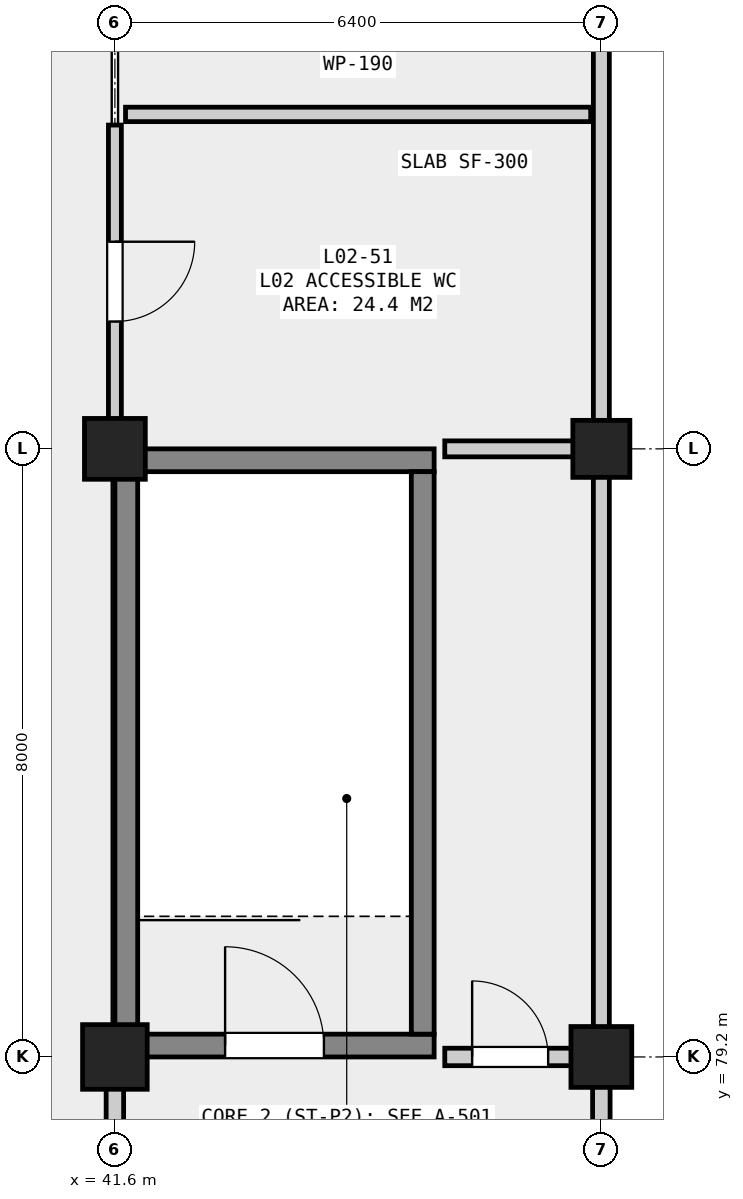
"""IFC4 building model, lengths in metres.
Left out: names, types, materials, properties, quantities, classifications, styles, units other than length and angle.
Written with IfcOpenShell. Run it as: python <this file> out.ifc"""

import sys

from ifc_helpers import new_model, si_unit, direction, frame, frame_2d, origin, origin_2d, place, context, subcontext, project, spatial, rectangle, extrude, element, fill, save


model = new_model("IFC4")
c1 = context("Model", 3, precision=1e-05, world=origin(), true_north=direction((0.0, 1.0)))
c2 = subcontext(c1, "Body", "Model", "MODEL_VIEW")
j1 = project(units=[si_unit("LENGTHUNIT", "METRE"), si_unit("PLANEANGLEUNIT", "RADIAN")], contexts=[c1])
p1 = place(None, origin())
s1 = spatial("IfcSite", under=j1, at=p1, CompositionType="ELEMENT")
p2 = place(p1, origin())
s2 = spatial("IfcBuilding", under=s1, at=p2, CompositionType="ELEMENT")
p3 = place(p2, frame((0.0, 0.0, 10.8)))
s3 = spatial("IfcBuildingStorey", under=s2, at=p3, CompositionType="ELEMENT", Elevation=10.8)
p4 = place(p3, frame((41.6, 79.2, 0.0), z_axis=(0.0, 0.0, 1.0), x_axis=(1.0, 0.0, 0.0)))
e1 = element("IfcColumn", 1, at=p4, inside=s3, PredefinedType="COLUMN", context=c2, shape_type="SweptSolid", body=[
    extrude(rectangle(XDim=0.85, YDim=0.85, at=origin_2d()), origin(), (0.0, 0.0, 1.0), 4.8),
])
for number, where, z_axis, x_axis in (
    (2, (41.6, 87.2, 0.0), (0.0, 0.0, 1.0), (1.0, 0.0, 0.0)),
    (3, (48.0, 79.2, 0.0), (0.0, 0.0, 1.0), (1.0, 0.0, 0.0)),
):
    element("IfcColumn", number, at=place(p3, frame(where, z_axis=z_axis, x_axis=x_axis)), inside=s3, PredefinedType="COLUMN", context=c2, shape_type="SweptSolid", body=[
        extrude(rectangle(XDim=0.8, YDim=0.8, at=origin_2d()), origin(), (0.0, 0.0, 1.0), 4.8),
    ])
p5 = place(p3, frame((48.0, 87.2, 0.0), z_axis=(0.0, 0.0, 1.0), x_axis=(1.0, 0.0, 0.0)))
e4 = element("IfcColumn", 4, at=p5, inside=s3, PredefinedType="COLUMN", context=c2, shape_type="SweptSolid", body=[
    extrude(rectangle(XDim=0.75, YDim=0.75, at=origin_2d()), origin(), (0.0, 0.0, 1.0), 4.8),
])
p6 = place(p3, frame((41.6, 79.35, 0.0), z_axis=(0.0, 0.0, 1.0), x_axis=(1.0, 0.0, 0.0)))
e5 = element("IfcWall", 5, at=p6, inside=s3, PredefinedType="SHEAR", context=c2, shape_type="SweptSolid", body=[
    extrude(rectangle(XDim=4.2, YDim=0.3, at=frame_2d((2.1, 0.0))), origin(), (0.0, 0.0, 1.0), 4.5),
])
p7 = place(p6, frame((1.45, 0.0, 0.0)))
e6 = element("IfcOpeningElement", 6, at=p7, cuts=e5, PredefinedType="OPENING", context=c2, shape_type="SweptSolid", body=[
    extrude(rectangle(XDim=1.3, YDim=2.18, at=frame_2d((0.65, 1.09))), frame((0.0, 0.162, 0.0), z_axis=(0.0, -1.0, 0.0), x_axis=(1.0, 0.0, 0.0)), (0.0, 0.0, 1.0), 0.324),
])
p8 = place(p3, frame((41.6, 87.05, 0.0), z_axis=(0.0, 0.0, 1.0), x_axis=(1.0, 0.0, 0.0)))
e7 = element("IfcWall", 7, at=p8, inside=s3, PredefinedType="SHEAR", context=c2, shape_type="SweptSolid", body=[
    extrude(rectangle(XDim=4.2, YDim=0.3, at=frame_2d((2.1, 0.0))), origin(), (0.0, 0.0, 1.0), 4.5),
])
for number, where, z_axis, x_axis in (
    (8, (41.75, 79.5, 0.0), (0.0, 0.0, 1.0), (0.0, 1.0, 0.0)),
    (9, (45.65, 79.5, 0.0), (0.0, 0.0, 1.0), (0.0, 1.0, 0.0)),
):
    element("IfcWall", number, at=place(p3, frame(where, z_axis=z_axis, x_axis=x_axis)), inside=s3, PredefinedType="SHEAR", context=c2, shape_type="SweptSolid", body=[
        extrude(rectangle(XDim=7.4, YDim=0.3, at=frame_2d((3.7, 0.0))), origin(), (0.0, 0.0, 1.0), 4.5),
    ])
p9 = place(p3, frame((45.94, 79.2, 0.0), z_axis=(0.0, 0.0, 1.0), x_axis=(1.0, 0.0, 0.0)))
e10 = element("IfcWall", 10, at=p9, inside=s3, PredefinedType="SOLIDWALL", context=c2, shape_type="SweptSolid", body=[
    extrude(rectangle(XDim=1.92, YDim=0.23, at=frame_2d((0.96, 0.0))), origin(), (0.0, 0.0, 1.0), 4.5),
])
p10 = place(p9, frame((0.36, 0.0, 0.0)))
e11 = element("IfcOpeningElement", 11, at=p10, cuts=e10, PredefinedType="OPENING", context=c2, shape_type="SweptSolid", body=[
    extrude(rectangle(XDim=1.0, YDim=2.15, at=frame_2d((0.5, 1.075))), frame((0.0, 0.127, 0.0), z_axis=(0.0, -1.0, 0.0), x_axis=(1.0, 0.0, 0.0)), (0.0, 0.0, 1.0), 0.254),
])
p11 = place(p3, frame((41.6, 75.54, 0.0), z_axis=(0.0, 0.0, 1.0), x_axis=(0.0, 1.0, 0.0)))
e12 = element("IfcWall", 12, at=p11, inside=s3, PredefinedType="SOLIDWALL", context=c2, shape_type="SweptSolid", body=[
    extrude(rectangle(XDim=3.52, YDim=0.23, at=frame_2d((1.76, 0.0))), origin(), (0.0, 0.0, 1.0), 4.5),
])
p12 = place(p3, frame((48.0, 75.54, 0.0), z_axis=(0.0, 0.0, 1.0), x_axis=(0.0, 1.0, 0.0)))
e13 = element("IfcWall", 13, at=p12, inside=s3, PredefinedType="SOLIDWALL", context=c2, shape_type="SweptSolid", body=[
    extrude(rectangle(XDim=3.52, YDim=0.23, at=frame_2d((1.76, 0.0))), origin(), (0.0, 0.0, 1.0), 3.9),
])
p13 = place(p3, frame((45.94, 87.2, 0.0), z_axis=(0.0, 0.0, 1.0), x_axis=(1.0, 0.0, 0.0)))
e14 = element("IfcWall", 14, at=p13, inside=s3, PredefinedType="SOLIDWALL", context=c2, shape_type="SweptSolid", body=[
    extrude(rectangle(XDim=1.92, YDim=0.21, at=frame_2d((0.96, 0.0))), origin(), (0.0, 0.0, 1.0), 4.5),
])
p14 = place(p3, frame((48.0, 79.34, 0.0), z_axis=(0.0, 0.0, 1.0), x_axis=(0.0, 1.0, 0.0)))
e15 = element("IfcWall", 15, at=p14, inside=s3, PredefinedType="SOLIDWALL", context=c2, shape_type="SweptSolid", body=[
    extrude(rectangle(XDim=7.72, YDim=0.21, at=frame_2d((3.86, 0.0))), origin(), (0.0, 0.0, 1.0), 3.9),
])
p15 = place(p3, frame((48.0, 87.2, 0.0), z_axis=(0.0, 0.0, 1.0), x_axis=(0.0, 1.0, 0.0)))
e16 = element("IfcWall", 16, at=p15, inside=s3, PredefinedType="SOLIDWALL", context=c2, shape_type="SweptSolid", body=[
    extrude(rectangle(XDim=7.825, YDim=0.21, at=frame_2d((3.913, 0.0))), origin(), (0.0, 0.0, 1.0), 3.9),
])
p16 = place(p3, frame((41.74, 91.6, 0.0), z_axis=(0.0, 0.0, 1.0), x_axis=(1.0, 0.0, 0.0)))
e17 = element("IfcWall", 17, at=p16, inside=s3, PredefinedType="PARTITIONING", context=c2, shape_type="SweptSolid", body=[
    extrude(rectangle(XDim=6.12, YDim=0.19, at=frame_2d((3.06, 0.0))), origin(), (0.0, 0.0, 1.0), 4.5),
])
p17 = place(p3, frame((41.6, 87.34, 0.0), z_axis=(0.0, 0.0, 1.0), x_axis=(0.0, 1.0, 0.0)))
e18 = element("IfcWall", 18, at=p17, inside=s3, PredefinedType="PARTITIONING", context=c2, shape_type="SweptSolid", body=[
    extrude(rectangle(XDim=4.12, YDim=0.17, at=frame_2d((2.06, 0.0))), origin(), (0.0, 0.0, 1.0), 4.5),
])
p18 = place(p17, frame((1.535, 0.0, 0.0)))
e19 = element("IfcOpeningElement", 19, at=p18, cuts=e18, PredefinedType="OPENING", context=c2, shape_type="SweptSolid", body=[
    extrude(rectangle(XDim=1.05, YDim=2.15, at=frame_2d((0.525, 1.075))), frame((0.0, 0.097, 0.0), z_axis=(0.0, -1.0, 0.0), x_axis=(1.0, 0.0, 0.0)), (0.0, 0.0, 1.0), 0.194),
])
p19 = place(p7, origin())
e20 = element("IfcDoor", 20, at=p19, inside=s3, OperationType="SINGLE_SWING_LEFT", PredefinedType="DOOR", context=c2, shape_type="SweptSolid", body=[
    extrude(rectangle(XDim=1.3, YDim=2.18, at=frame_2d((0.65, 1.09))), frame((0.0, 0.025, 0.0), z_axis=(0.0, -1.0, 0.0), x_axis=(1.0, 0.0, 0.0)), (0.0, 0.0, 1.0), 0.05),
])
fill(e6, e20)
p20 = place(p10, origin())
e21 = element("IfcDoor", 21, at=p20, inside=s3, OperationType="SINGLE_SWING_LEFT", PredefinedType="DOOR", context=c2, shape_type="SweptSolid", body=[
    extrude(rectangle(XDim=1.0, YDim=2.15, at=frame_2d((0.5, 1.075))), frame((0.0, 0.025, 0.0), z_axis=(0.0, -1.0, 0.0), x_axis=(1.0, 0.0, 0.0)), (0.0, 0.0, 1.0), 0.05),
])
fill(e11, e21)
p21 = place(p18, frame((1.05, 0.0, 0.0), z_axis=(0.0, 0.0, 1.0), x_axis=(-1.0, 0.0, 0.0)))
e22 = element("IfcDoor", 22, at=p21, inside=s3, OperationType="SINGLE_SWING_LEFT", PredefinedType="DOOR", context=c2, shape_type="SweptSolid", body=[
    extrude(rectangle(XDim=1.05, YDim=2.15, at=frame_2d((0.525, 1.075))), frame((0.0, 0.025, 0.0), z_axis=(0.0, -1.0, 0.0), x_axis=(1.0, 0.0, 0.0)), (0.0, 0.0, 1.0), 0.05),
])
fill(e19, e22)
save(model, sys.argv[1])
